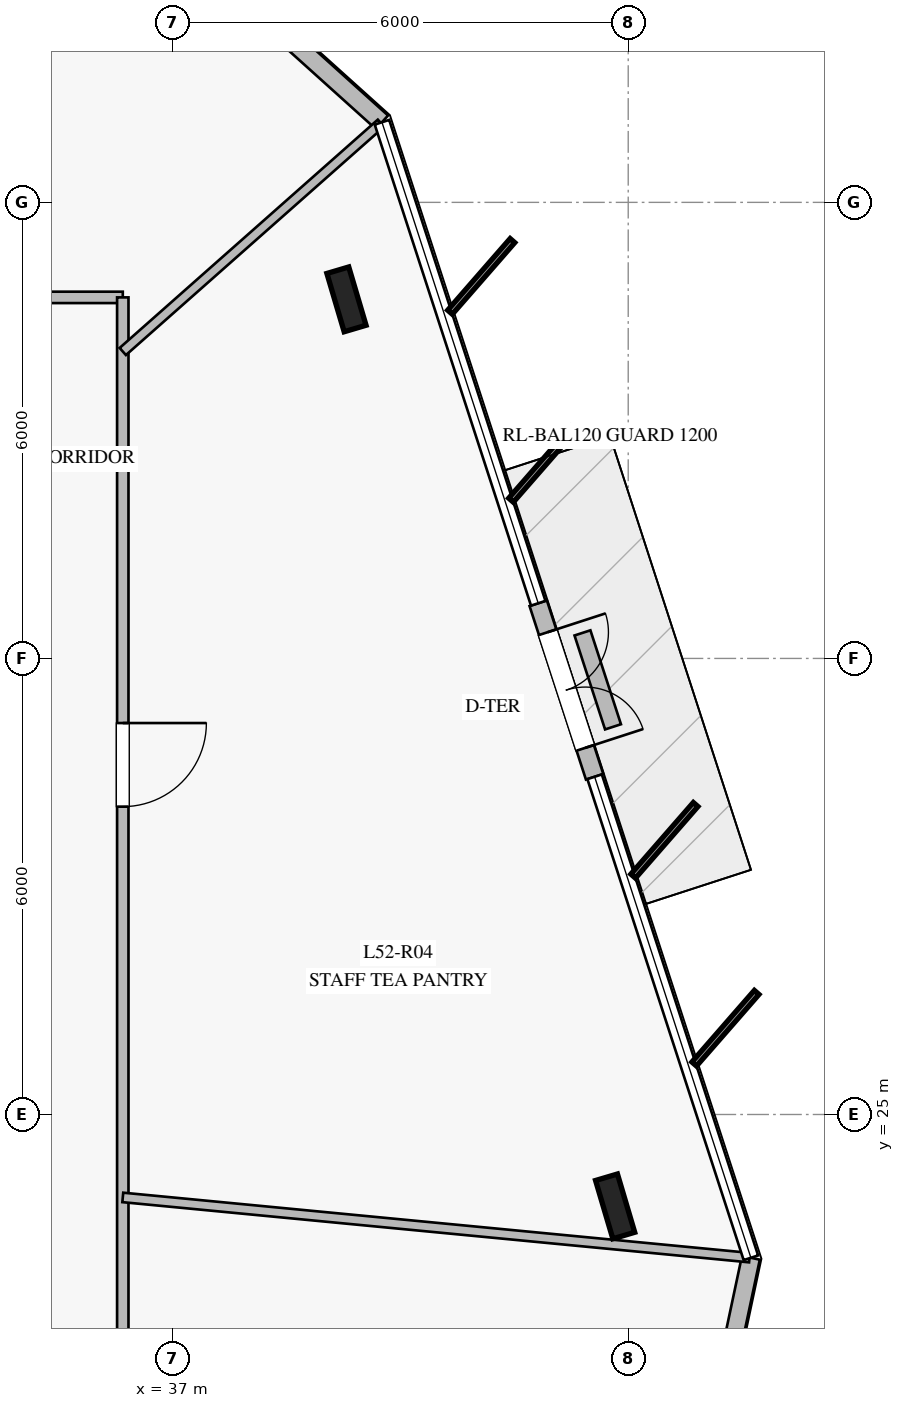
"""IFC4 building model, lengths in metres.
Left out: names, types, materials, properties, quantities, classifications, styles, units other than length and angle.
Written with IfcOpenShell. Run it as: python <this file> out.ifc"""

import sys

from ifc_helpers import new_model, si_unit, direction, frame, frame_2d, origin, origin_2d, place, context, subcontext, project, spatial, rectangle, i_section, extrude, element, fill, save


model = new_model("IFC4")
c1 = context("Model", 3, precision=1e-05, world=origin(), true_north=direction((0.0, 1.0)))
c2 = subcontext(c1, "Body", "Model", "MODEL_VIEW")
j1 = project(units=[si_unit("LENGTHUNIT", "METRE"), si_unit("PLANEANGLEUNIT", "RADIAN")], contexts=[c1])
p1 = place(None, origin())
s1 = spatial("IfcSite", under=j1, at=p1, CompositionType="ELEMENT")
p2 = place(p1, origin())
s2 = spatial("IfcBuilding", under=s1, at=p2, CompositionType="ELEMENT")
p3 = place(p2, frame((0.0, 0.0, 216.8)))
s3 = spatial("IfcBuildingStorey", under=s2, at=p3, CompositionType="ELEMENT", Elevation=216.8)
for number, where, z_axis, x_axis in (
    (1, (42.828, 23.791, 0.0), (0.0, 0.0, 1.0), (-0.284, 0.959, 0.0)),
    (2, (39.293, 35.724, 0.0), (0.0, 0.0, 1.0), (-0.284, 0.959, 0.0)),
):
    element("IfcColumn", number, at=place(p3, frame(where, z_axis=z_axis, x_axis=x_axis)), inside=s3, PredefinedType="COLUMN", context=c2, shape_type="SweptSolid", body=[
        extrude(i_section(OverallWidth=0.3, OverallDepth=0.8, WebThickness=0.018, FlangeThickness=0.033, at=origin_2d()), origin(), (0.0, 0.0, 1.0), 4.0),
    ])
p4 = place(p3, frame((43.685, 18.744, 0.0), z_axis=(0.0, 0.0, 1.0), x_axis=(0.20787966491, 0.978154407503, 0.0)))
e3 = element("IfcWall", 3, at=p4, inside=s3, PredefinedType="STANDARD", context=c2, shape_type="SweptSolid", body=[
    extrude(rectangle(XDim=4.469, YDim=0.24, at=frame_2d((2.234, 0.0))), origin(), (0.0, 0.0, 1.0), 3.78),
])
p5 = place(p3, frame((42.558, 29.443, 0.0), z_axis=(0.0, 0.0, 1.0), x_axis=(-0.309171157328, 0.951006411901, 0.0)))
e4 = element("IfcWall", 4, at=p5, inside=s3, PredefinedType="STANDARD", context=c2, shape_type="SweptSolid", body=[
    extrude(rectangle(XDim=2.401, YDim=0.24, at=frame_2d((1.2, 0.0))), origin(), (0.0, 0.0, 1.0), 3.78),
])
p6 = place(p5, frame((0.4, 0.0, 0.0)))
e5 = element("IfcOpeningElement", 5, at=p6, cuts=e4, PredefinedType="OPENING", context=c2, shape_type="SweptSolid", body=[
    extrude(rectangle(XDim=1.6, YDim=2.25, at=frame_2d((0.8, 1.125))), frame((0.0, 0.13, 0.0), z_axis=(0.0, -1.0, 0.0), x_axis=(1.0, 0.0, 0.0)), (0.0, 0.0, 1.0), 0.26),
])
p7 = place(p3, frame((39.76, 38.054, 0.0), z_axis=(0.0, 0.0, 1.0), x_axis=(-0.74307946371, 0.669203190827, 0.0)))
e6 = element("IfcWall", 6, at=p7, inside=s3, PredefinedType="STANDARD", context=c2, shape_type="SweptSolid", body=[
    extrude(rectangle(XDim=4.468, YDim=0.24, at=frame_2d((2.234, 0.0))), origin(), (0.0, 0.0, 1.0), 3.78),
])
p8 = place(p3, frame((42.8, 30.1, 0.0), z_axis=(0.0, 0.0, 1.0), x_axis=(-0.309400389293, 0.950931858287, 0.0)))
e7 = element("IfcWall", 7, at=p8, inside=s3, PredefinedType="USERDEFINED", context=c2, shape_type="SweptSolid", body=[
    extrude(rectangle(XDim=1.3, YDim=0.22, at=frame_2d((0.65, 0.0))), origin(), (0.0, 0.0, 1.0), 0.4),
])
p9 = place(p3, frame((13.65, 35.75, 0.0), z_axis=(0.0, 0.0, 1.0), x_axis=(1.0, 0.0, 0.0)))
e8 = element("IfcWall", 8, at=p9, inside=s3, PredefinedType="PARTITIONING", context=c2, shape_type="SweptSolid", body=[
    extrude(rectangle(XDim=22.7, YDim=0.15, at=frame_2d((11.35, 0.0))), origin(), (0.0, 0.0, 1.0), 3.05),
])
p10 = place(p9, frame((16.645, 0.0, 0.0)))
e9 = element("IfcOpeningElement", 9, at=p10, cuts=e8, PredefinedType="OPENING", context=c2, shape_type="SweptSolid", body=[
    extrude(rectangle(XDim=1.1, YDim=2.2, at=frame_2d((0.55, 1.1))), frame((0.0, 0.085, 0.0), z_axis=(0.0, -1.0, 0.0), x_axis=(1.0, 0.0, 0.0)), (0.0, 0.0, 1.0), 0.17),
])
p11 = place(p9, frame((5.662, 0.0, 0.0)))
e10 = element("IfcOpeningElement", 10, at=p11, cuts=e8, PredefinedType="OPENING", context=c2, shape_type="SweptSolid", body=[
    extrude(rectangle(XDim=1.1, YDim=2.2, at=frame_2d((0.55, 1.1))), frame((0.0, 0.085, 0.0), z_axis=(0.0, -1.0, 0.0), x_axis=(1.0, 0.0, 0.0)), (0.0, 0.0, 1.0), 0.17),
])
p12 = place(p3, frame((36.35, 35.75, 0.0), z_axis=(0.0, 0.0, 1.0), x_axis=(0.0, -1.0, 0.0)))
e11 = element("IfcWall", 11, at=p12, inside=s3, PredefinedType="PARTITIONING", context=c2, shape_type="SweptSolid", body=[
    extrude(rectangle(XDim=21.5, YDim=0.15, at=frame_2d((10.75, 0.0))), origin(), (0.0, 0.0, 1.0), 3.28),
])
p13 = place(p12, frame((15.94, 0.0, 0.0)))
e12 = element("IfcOpeningElement", 12, at=p13, cuts=e11, PredefinedType="OPENING", context=c2, shape_type="SweptSolid", body=[
    extrude(rectangle(XDim=1.1, YDim=2.2, at=frame_2d((0.55, 1.1))), frame((0.0, 0.085, 0.0), z_axis=(0.0, -1.0, 0.0), x_axis=(1.0, 0.0, 0.0)), (0.0, 0.0, 1.0), 0.17),
])
p14 = place(p12, frame((5.6, 0.0, 0.0)))
e13 = element("IfcOpeningElement", 13, at=p14, cuts=e11, PredefinedType="OPENING", context=c2, shape_type="SweptSolid", body=[
    extrude(rectangle(XDim=1.1, YDim=2.2, at=frame_2d((0.55, 1.1))), frame((0.0, 0.085, 0.0), z_axis=(0.0, -1.0, 0.0), x_axis=(1.0, 0.0, 0.0)), (0.0, 0.0, 1.0), 0.17),
])
p15 = place(p3, frame((36.35, 23.909, 0.0), z_axis=(0.0, 0.0, 1.0), x_axis=(0.995419121173, -0.095607390943, 0.0)))
e14 = element("IfcWall", 14, at=p15, inside=s3, PredefinedType="PARTITIONING", context=c2, shape_type="SweptSolid", body=[
    extrude(rectangle(XDim=8.284, YDim=0.125, at=frame_2d((4.142, 0.0))), origin(), (0.0, 0.0, 1.0), 3.18),
])
p16 = place(p3, frame((36.35, 35.038, 0.0), z_axis=(0.0, 0.0, 1.0), x_axis=(0.749117810884, 0.662436793526, 0.0)))
e15 = element("IfcWall", 15, at=p16, inside=s3, PredefinedType="PARTITIONING", context=c2, shape_type="SweptSolid", body=[
    extrude(rectangle(XDim=4.535, YDim=0.125, at=frame_2d((2.267, 0.0))), origin(), (0.0, 0.0, 1.0), 3.18),
])
p17 = place(p6, frame((1.6, 0.0, 0.0), z_axis=(0.0, 0.0, 1.0), x_axis=(-1.0, 0.0, 0.0)))
e16 = element("IfcDoor", 16, at=p17, inside=s3, OperationType="DOUBLE_DOOR_SINGLE_SWING", PredefinedType="DOOR", context=c2, shape_type="SweptSolid", body=[
    extrude(rectangle(XDim=1.6, YDim=2.25, at=frame_2d((0.8, 1.125))), frame((0.0, 0.025, 0.0), z_axis=(0.0, -1.0, 0.0), x_axis=(1.0, 0.0, 0.0)), (0.0, 0.0, 1.0), 0.05),
])
fill(e5, e16)
p18 = place(p14, origin())
e17 = element("IfcDoor", 17, at=p18, inside=s3, OperationType="SINGLE_SWING_LEFT", PredefinedType="DOOR", context=c2, shape_type="SweptSolid", body=[
    extrude(rectangle(XDim=1.1, YDim=2.2, at=frame_2d((0.55, 1.1))), frame((0.0, 0.025, 0.0), z_axis=(0.0, -1.0, 0.0), x_axis=(1.0, 0.0, 0.0)), (0.0, 0.0, 1.0), 0.05),
])
fill(e13, e17)
save(model, sys.argv[1])
